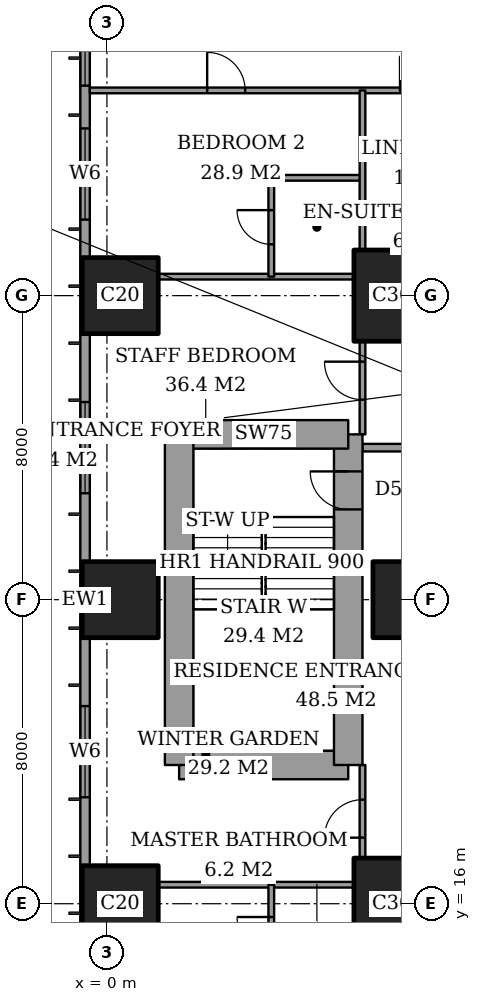
"""IFC4 building model, lengths in metres.
Left out: names, types, materials, properties, quantities, classifications, styles, units other than length and angle.
Written with IfcOpenShell. Run it as: python <this file> out.ifc"""

import sys

from ifc_helpers import new_model, si_unit, direction, frame, frame_2d, origin, origin_2d, place, context, subcontext, project, spatial, rectangle, extrude, element, fill, save


model = new_model("IFC4")
c1 = context("Model", 3, precision=1e-05, world=origin(), true_north=direction((0.0, 1.0)))
c2 = subcontext(c1, "Body", "Model", "MODEL_VIEW")
j1 = project(units=[si_unit("LENGTHUNIT", "METRE"), si_unit("PLANEANGLEUNIT", "RADIAN")], contexts=[c1])
p1 = place(None, origin())
s1 = spatial("IfcSite", under=j1, at=p1, CompositionType="ELEMENT")
p2 = place(p1, origin())
s2 = spatial("IfcBuilding", under=s1, at=p2, CompositionType="ELEMENT")
p3 = place(p2, frame((0.0, 0.0, 44.0)))
s3 = spatial("IfcBuildingStorey", under=s2, at=p3, CompositionType="ELEMENT", Elevation=44.0)
for number, where, z_axis, x_axis in (
    (1, (0.35, 16.0, 0.0), (0.0, 0.0, 1.0), (1.0, 0.0, 0.0)),
    (2, (0.35, 24.0, 0.0), (0.0, 0.0, 1.0), (1.0, 0.0, 0.0)),
    (3, (0.35, 32.0, 0.0), (0.0, 0.0, 1.0), (1.0, 0.0, 0.0)),
):
    element("IfcColumn", number, at=place(p3, frame(where, z_axis=z_axis, x_axis=x_axis)), inside=s3, PredefinedType="COLUMN", context=c2, shape_type="SweptSolid", body=[
        extrude(rectangle(XDim=2.0, YDim=2.0, at=origin_2d()), origin(), (0.0, 0.0, 1.0), 3.6),
    ])
p4 = place(p3, frame((8.0, 16.0, 0.0), z_axis=(0.0, 0.0, 1.0), x_axis=(1.0, 0.0, 0.0)))
e4 = element("IfcColumn", 4, at=p4, inside=s3, PredefinedType="COLUMN", context=c2, shape_type="SweptSolid", body=[
    extrude(rectangle(XDim=3.0, YDim=2.4, at=origin_2d()), origin(), (0.0, 0.0, 1.0), 3.6),
])
p5 = place(p3, frame((8.0, 24.0, 0.0), z_axis=(0.0, 0.0, 1.0), x_axis=(1.0, 0.0, 0.0)))
e5 = element("IfcColumn", 5, at=p5, inside=s3, PredefinedType="COLUMN", context=c2, shape_type="SweptSolid", body=[
    extrude(rectangle(XDim=2.0, YDim=2.0, at=origin_2d()), origin(), (0.0, 0.0, 1.0), 3.6),
])
p6 = place(p3, frame((8.0, 32.0, 0.0), z_axis=(0.0, 0.0, 1.0), x_axis=(1.0, 0.0, 0.0)))
e6 = element("IfcColumn", 6, at=p6, inside=s3, PredefinedType="COLUMN", context=c2, shape_type="SweptSolid", body=[
    extrude(rectangle(XDim=3.0, YDim=2.4, at=origin_2d()), origin(), (0.0, 0.0, 1.0), 3.6),
])
p7 = place(p3, frame((1.9, 19.65, 0.0), z_axis=(0.0, 0.0, 1.0), x_axis=(1.0, 0.0, 0.0)))
e7 = element("IfcWall", 7, at=p7, inside=s3, PredefinedType="SHEAR", context=c2, shape_type="SweptSolid", body=[
    extrude(rectangle(XDim=4.45, YDim=0.75, at=frame_2d((2.225, 0.0))), origin(), (0.0, 0.0, 1.0), 3.6),
])
p8 = place(p3, frame((6.35, 19.65, 0.0), z_axis=(0.0, 0.0, 1.0), x_axis=(0.0, 1.0, 0.0)))
e8 = element("IfcWall", 8, at=p8, inside=s3, PredefinedType="SHEAR", context=c2, shape_type="SweptSolid", body=[
    extrude(rectangle(XDim=8.7, YDim=0.75, at=frame_2d((4.35, 0.0))), origin(), (0.0, 0.0, 1.0), 3.6),
])
p9 = place(p8, frame((6.725, 0.0, 0.0)))
e9 = element("IfcOpeningElement", 9, at=p9, cuts=e8, PredefinedType="OPENING", context=c2, shape_type="SweptSolid", body=[
    extrude(rectangle(XDim=1.0, YDim=2.1, at=frame_2d((0.5, 1.05))), frame((0.0, 0.385, 0.0), z_axis=(0.0, -1.0, 0.0), x_axis=(1.0, 0.0, 0.0)), (0.0, 0.0, 1.0), 0.77),
])
p10 = place(p3, frame((6.35, 28.35, 0.0), z_axis=(0.0, 0.0, 1.0), x_axis=(-1.0, 0.0, 0.0)))
e10 = element("IfcWall", 10, at=p10, inside=s3, PredefinedType="SHEAR", context=c2, shape_type="SweptSolid", body=[
    extrude(rectangle(XDim=4.45, YDim=0.75, at=frame_2d((2.225, 0.0))), origin(), (0.0, 0.0, 1.0), 3.6),
])
p11 = place(p3, frame((1.9, 28.35, 0.0), z_axis=(0.0, 0.0, 1.0), x_axis=(0.0, -1.0, 0.0)))
e11 = element("IfcWall", 11, at=p11, inside=s3, PredefinedType="SHEAR", context=c2, shape_type="SweptSolid", body=[
    extrude(rectangle(XDim=8.7, YDim=0.75, at=frame_2d((4.35, 0.0))), origin(), (0.0, 0.0, 1.0), 3.6),
])
p12 = place(p3, frame((-0.575, 44.825, 0.0), z_axis=(0.0, 0.0, 1.0), x_axis=(0.0, -1.0, 0.0)))
e12 = element("IfcWall", 12, at=p12, inside=s3, PredefinedType="SOLIDWALL", context=c2, shape_type="SweptSolid", body=[
    extrude(rectangle(XDim=41.65, YDim=0.25, at=frame_2d((20.825, 0.0))), origin(), (0.0, 0.0, 1.0), 3.6),
])
p13 = place(p12, frame((0.775, 0.0, 0.6)))
e13 = element("IfcOpeningElement", 13, at=p13, cuts=e12, PredefinedType="OPENING", context=c2, shape_type="SweptSolid", body=[
    extrude(rectangle(XDim=2.4, YDim=2.0, at=frame_2d((1.2, 1.0))), frame((0.0, 0.135, 0.0), z_axis=(0.0, -1.0, 0.0), x_axis=(1.0, 0.0, 0.0)), (0.0, 0.0, 1.0), 0.27),
])
p14 = place(p12, frame((6.1, 0.0, 0.6)))
e14 = element("IfcOpeningElement", 14, at=p14, cuts=e12, PredefinedType="OPENING", context=c2, shape_type="SweptSolid", body=[
    extrude(rectangle(XDim=1.2, YDim=2.0, at=frame_2d((0.6, 1.0))), frame((0.0, 0.135, 0.0), z_axis=(0.0, -1.0, 0.0), x_axis=(1.0, 0.0, 0.0)), (0.0, 0.0, 1.0), 0.27),
])
p15 = place(p12, frame((8.425, 0.0, 0.6)))
e15 = element("IfcOpeningElement", 15, at=p15, cuts=e12, PredefinedType="OPENING", context=c2, shape_type="SweptSolid", body=[
    extrude(rectangle(XDim=2.4, YDim=2.0, at=frame_2d((1.2, 1.0))), frame((0.0, 0.135, 0.0), z_axis=(0.0, -1.0, 0.0), x_axis=(1.0, 0.0, 0.0)), (0.0, 0.0, 1.0), 0.27),
])
p16 = place(p12, frame((15.625, 0.0, 0.6)))
e16 = element("IfcOpeningElement", 16, at=p16, cuts=e12, PredefinedType="OPENING", context=c2, shape_type="SweptSolid", body=[
    extrude(rectangle(XDim=2.4, YDim=2.0, at=frame_2d((1.2, 1.0))), frame((0.0, 0.135, 0.0), z_axis=(0.0, -1.0, 0.0), x_axis=(1.0, 0.0, 0.0)), (0.0, 0.0, 1.0), 0.27),
])
p17 = place(p12, frame((23.625, 0.0, 0.6)))
e17 = element("IfcOpeningElement", 17, at=p17, cuts=e12, PredefinedType="OPENING", context=c2, shape_type="SweptSolid", body=[
    extrude(rectangle(XDim=2.4, YDim=2.0, at=frame_2d((1.2, 1.0))), frame((0.0, 0.135, 0.0), z_axis=(0.0, -1.0, 0.0), x_axis=(1.0, 0.0, 0.0)), (0.0, 0.0, 1.0), 0.27),
])
p18 = place(p12, frame((30.825, 0.0, 0.6)))
e18 = element("IfcOpeningElement", 18, at=p18, cuts=e12, PredefinedType="OPENING", context=c2, shape_type="SweptSolid", body=[
    extrude(rectangle(XDim=2.4, YDim=2.0, at=frame_2d((1.2, 1.0))), frame((0.0, 0.135, 0.0), z_axis=(0.0, -1.0, 0.0), x_axis=(1.0, 0.0, 0.0)), (0.0, 0.0, 1.0), 0.27),
])
p19 = place(p12, frame((34.5, 0.0, 0.6)))
e19 = element("IfcOpeningElement", 19, at=p19, cuts=e12, PredefinedType="OPENING", context=c2, shape_type="SweptSolid", body=[
    extrude(rectangle(XDim=1.2, YDim=2.0, at=frame_2d((0.6, 1.0))), frame((0.0, 0.135, 0.0), z_axis=(0.0, -1.0, 0.0), x_axis=(1.0, 0.0, 0.0)), (0.0, 0.0, 1.0), 0.27),
])
p20 = place(p12, frame((38.475, 0.0, 0.6)))
e20 = element("IfcOpeningElement", 20, at=p20, cuts=e12, PredefinedType="OPENING", context=c2, shape_type="SweptSolid", body=[
    extrude(rectangle(XDim=2.4, YDim=2.0, at=frame_2d((1.2, 1.0))), frame((0.0, 0.135, 0.0), z_axis=(0.0, -1.0, 0.0), x_axis=(1.0, 0.0, 0.0)), (0.0, 0.0, 1.0), 0.27),
])
p21 = place(p3, frame((1.35, 16.5, 0.0), z_axis=(0.0, 0.0, 1.0), x_axis=(1.0, 0.0, 0.0)))
e21 = element("IfcWall", 21, at=p21, inside=s3, PredefinedType="PARTITIONING", context=c2, shape_type="SweptSolid", body=[
    extrude(rectangle(XDim=5.15, YDim=0.15, at=frame_2d((2.575, 0.0))), origin(), (0.0, 0.0, 1.0), 3.35),
])
p22 = place(p3, frame((6.725, 28.0, 0.0), z_axis=(0.0, 0.0, 1.0), x_axis=(1.0, 0.0, 0.0)))
e22 = element("IfcWall", 22, at=p22, inside=s3, PredefinedType="PARTITIONING", context=c2, shape_type="SweptSolid", body=[
    extrude(rectangle(XDim=17.275, YDim=0.2, at=frame_2d((8.637, 0.0))), origin(), (0.0, 0.0, 1.0), 3.35),
])
p23 = place(p22, frame((6.475, 0.0, 0.0)))
e23 = element("IfcOpeningElement", 23, at=p23, cuts=e22, PredefinedType="OPENING", context=c2, shape_type="SweptSolid", body=[
    extrude(rectangle(XDim=1.2, YDim=2.4, at=frame_2d((0.6, 1.2))), frame((0.0, 0.11, 0.0), z_axis=(0.0, -1.0, 0.0), x_axis=(1.0, 0.0, 0.0)), (0.0, 0.0, 1.0), 0.22),
])
p24 = place(p3, frame((1.35, 32.5, 0.0), z_axis=(0.0, 0.0, 1.0), x_axis=(1.0, 0.0, 0.0)))
e24 = element("IfcWall", 24, at=p24, inside=s3, PredefinedType="PARTITIONING", context=c2, shape_type="SweptSolid", body=[
    extrude(rectangle(XDim=5.15, YDim=0.15, at=frame_2d((2.575, 0.0))), origin(), (0.0, 0.0, 1.0), 3.35),
])
p25 = place(p3, frame((4.325, 35.1, 0.0), z_axis=(0.0, 0.0, 1.0), x_axis=(1.0, 0.0, 0.0)))
e25 = element("IfcWall", 25, at=p25, inside=s3, PredefinedType="PARTITIONING", context=c2, shape_type="SweptSolid", body=[
    extrude(rectangle(XDim=2.4, YDim=0.15, at=frame_2d((1.2, 0.0))), origin(), (0.0, 0.0, 1.0), 3.35),
])
p26 = place(p3, frame((-0.45, 37.4, 0.0), z_axis=(0.0, 0.0, 1.0), x_axis=(1.0, 0.0, 0.0)))
e26 = element("IfcWall", 26, at=p26, inside=s3, PredefinedType="PARTITIONING", context=c2, shape_type="SweptSolid", body=[
    extrude(rectangle(XDim=25.011, YDim=0.15, at=frame_2d((12.505, 0.0))), origin(), (0.0, 0.0, 1.0), 3.35),
])
p27 = place(p26, frame((10.65, 0.0, 0.0)))
e27 = element("IfcOpeningElement", 27, at=p27, cuts=e26, PredefinedType="OPENING", context=c2, shape_type="SweptSolid", body=[
    extrude(rectangle(XDim=1.0, YDim=2.1, at=frame_2d((0.5, 1.05))), frame((0.0, 0.085, 0.0), z_axis=(0.0, -1.0, 0.0), x_axis=(1.0, 0.0, 0.0)), (0.0, 0.0, 1.0), 0.17),
])
p28 = place(p26, frame((3.087, 0.0, 0.0)))
e28 = element("IfcOpeningElement", 28, at=p28, cuts=e26, PredefinedType="OPENING", context=c2, shape_type="SweptSolid", body=[
    extrude(rectangle(XDim=1.0, YDim=2.1, at=frame_2d((0.5, 1.05))), frame((0.0, 0.085, 0.0), z_axis=(0.0, -1.0, 0.0), x_axis=(1.0, 0.0, 0.0)), (0.0, 0.0, 1.0), 0.17),
])
p29 = place(p26, frame((8.163, 0.0, 0.0)))
e29 = element("IfcOpeningElement", 29, at=p29, cuts=e26, PredefinedType="OPENING", context=c2, shape_type="SweptSolid", body=[
    extrude(rectangle(XDim=0.9, YDim=2.1, at=frame_2d((0.45, 1.05))), frame((0.0, 0.085, 0.0), z_axis=(0.0, -1.0, 0.0), x_axis=(1.0, 0.0, 0.0)), (0.0, 0.0, 1.0), 0.17),
])
p30 = place(p26, frame((13.35, 0.0, 0.0)))
e30 = element("IfcOpeningElement", 30, at=p30, cuts=e26, PredefinedType="OPENING", context=c2, shape_type="SweptSolid", body=[
    extrude(rectangle(XDim=1.0, YDim=2.1, at=frame_2d((0.5, 1.05))), frame((0.0, 0.085, 0.0), z_axis=(0.0, -1.0, 0.0), x_axis=(1.0, 0.0, 0.0)), (0.0, 0.0, 1.0), 0.17),
])
p31 = place(p26, frame((16.45, 0.0, 0.0)))
e31 = element("IfcOpeningElement", 31, at=p31, cuts=e26, PredefinedType="OPENING", context=c2, shape_type="SweptSolid", body=[
    extrude(rectangle(XDim=1.0, YDim=2.1, at=frame_2d((0.5, 1.05))), frame((0.0, 0.085, 0.0), z_axis=(0.0, -1.0, 0.0), x_axis=(1.0, 0.0, 0.0)), (0.0, 0.0, 1.0), 0.17),
])
p32 = place(p26, frame((21.175, 0.0, 0.0)))
e32 = element("IfcOpeningElement", 32, at=p32, cuts=e26, PredefinedType="OPENING", context=c2, shape_type="SweptSolid", body=[
    extrude(rectangle(XDim=1.0, YDim=2.1, at=frame_2d((0.5, 1.05))), frame((0.0, 0.085, 0.0), z_axis=(0.0, -1.0, 0.0), x_axis=(1.0, 0.0, 0.0)), (0.0, 0.0, 1.0), 0.17),
])
p33 = place(p3, frame((4.325, 13.9, 0.0), z_axis=(0.0, 0.0, 1.0), x_axis=(0.0, 1.0, 0.0)))
e33 = element("IfcWall", 33, at=p33, inside=s3, PredefinedType="PARTITIONING", context=c2, shape_type="SweptSolid", body=[
    extrude(rectangle(XDim=2.6, YDim=0.15, at=frame_2d((1.3, 0.0))), origin(), (0.0, 0.0, 1.0), 3.35),
])
p34 = place(p33, frame((0.85, 0.0, 0.0)))
e34 = element("IfcOpeningElement", 34, at=p34, cuts=e33, PredefinedType="OPENING", context=c2, shape_type="SweptSolid", body=[
    extrude(rectangle(XDim=0.9, YDim=2.1, at=frame_2d((0.45, 1.05))), frame((0.0, 0.085, 0.0), z_axis=(0.0, -1.0, 0.0), x_axis=(1.0, 0.0, 0.0)), (0.0, 0.0, 1.0), 0.17),
])
p35 = place(p3, frame((4.325, 32.5, 0.0), z_axis=(0.0, 0.0, 1.0), x_axis=(0.0, 1.0, 0.0)))
e35 = element("IfcWall", 35, at=p35, inside=s3, PredefinedType="PARTITIONING", context=c2, shape_type="SweptSolid", body=[
    extrude(rectangle(XDim=2.6, YDim=0.15, at=frame_2d((1.3, 0.0))), origin(), (0.0, 0.0, 1.0), 3.35),
])
p36 = place(p35, frame((0.85, 0.0, 0.0)))
e36 = element("IfcOpeningElement", 36, at=p36, cuts=e35, PredefinedType="OPENING", context=c2, shape_type="SweptSolid", body=[
    extrude(rectangle(XDim=0.9, YDim=2.1, at=frame_2d((0.45, 1.05))), frame((0.0, 0.085, 0.0), z_axis=(0.0, -1.0, 0.0), x_axis=(1.0, 0.0, 0.0)), (0.0, 0.0, 1.0), 0.17),
])
p37 = place(p3, frame((6.725, 17.2, 0.0), z_axis=(0.0, 0.0, 1.0), x_axis=(0.0, 1.0, 0.0)))
e37 = element("IfcWall", 37, at=p37, inside=s3, PredefinedType="PARTITIONING", context=c2, shape_type="SweptSolid", body=[
    extrude(rectangle(XDim=2.45, YDim=0.15, at=frame_2d((1.225, 0.0))), origin(), (0.0, 0.0, 1.0), 3.35),
])
p38 = place(p37, frame((0.538, 0.0, 0.0)))
e38 = element("IfcOpeningElement", 38, at=p38, cuts=e37, PredefinedType="OPENING", context=c2, shape_type="SweptSolid", body=[
    extrude(rectangle(XDim=1.0, YDim=2.1, at=frame_2d((0.5, 1.05))), frame((0.0, 0.085, 0.0), z_axis=(0.0, -1.0, 0.0), x_axis=(1.0, 0.0, 0.0)), (0.0, 0.0, 1.0), 0.17),
])
p39 = place(p3, frame((6.725, 28.35, 0.0), z_axis=(0.0, 0.0, 1.0), x_axis=(0.0, 1.0, 0.0)))
e39 = element("IfcWall", 39, at=p39, inside=s3, PredefinedType="PARTITIONING", context=c2, shape_type="SweptSolid", body=[
    extrude(rectangle(XDim=2.45, YDim=0.15, at=frame_2d((1.225, 0.0))), origin(), (0.0, 0.0, 1.0), 3.35),
])
p40 = place(p39, frame((0.913, 0.0, 0.0)))
e40 = element("IfcOpeningElement", 40, at=p40, cuts=e39, PredefinedType="OPENING", context=c2, shape_type="SweptSolid", body=[
    extrude(rectangle(XDim=1.0, YDim=2.1, at=frame_2d((0.5, 1.05))), frame((0.0, 0.085, 0.0), z_axis=(0.0, -1.0, 0.0), x_axis=(1.0, 0.0, 0.0)), (0.0, 0.0, 1.0), 0.17),
])
p41 = place(p3, frame((6.725, 33.2, 0.0), z_axis=(0.0, 0.0, 1.0), x_axis=(0.0, 1.0, 0.0)))
e41 = element("IfcWall", 41, at=p41, inside=s3, PredefinedType="PARTITIONING", context=c2, shape_type="SweptSolid", body=[
    extrude(rectangle(XDim=4.2, YDim=0.15, at=frame_2d((2.1, 0.0))), origin(), (0.0, 0.0, 1.0), 3.35),
])
p42 = place(p14, origin())
e42 = element("IfcWindow", 42, at=p42, inside=s3, PartitioningType="SINGLE_PANEL", PredefinedType="WINDOW", context=c2, shape_type="SweptSolid", body=[
    extrude(rectangle(XDim=1.2, YDim=2.0, at=frame_2d((0.6, 1.0))), frame((0.0, 0.03, 0.0), z_axis=(0.0, -1.0, 0.0), x_axis=(1.0, 0.0, 0.0)), (0.0, 0.0, 1.0), 0.06),
])
fill(e14, e42)
p43 = place(p15, origin())
e43 = element("IfcWindow", 43, at=p43, inside=s3, PartitioningType="SINGLE_PANEL", PredefinedType="WINDOW", context=c2, shape_type="SweptSolid", body=[
    extrude(rectangle(XDim=2.4, YDim=2.0, at=frame_2d((1.2, 1.0))), frame((0.0, 0.03, 0.0), z_axis=(0.0, -1.0, 0.0), x_axis=(1.0, 0.0, 0.0)), (0.0, 0.0, 1.0), 0.06),
])
fill(e15, e43)
p44 = place(p16, origin())
e44 = element("IfcWindow", 44, at=p44, inside=s3, PartitioningType="SINGLE_PANEL", PredefinedType="WINDOW", context=c2, shape_type="SweptSolid", body=[
    extrude(rectangle(XDim=2.4, YDim=2.0, at=frame_2d((1.2, 1.0))), frame((0.0, 0.03, 0.0), z_axis=(0.0, -1.0, 0.0), x_axis=(1.0, 0.0, 0.0)), (0.0, 0.0, 1.0), 0.06),
])
fill(e16, e44)
p45 = place(p17, origin())
e45 = element("IfcWindow", 45, at=p45, inside=s3, PartitioningType="SINGLE_PANEL", PredefinedType="WINDOW", context=c2, shape_type="SweptSolid", body=[
    extrude(rectangle(XDim=2.4, YDim=2.0, at=frame_2d((1.2, 1.0))), frame((0.0, 0.03, 0.0), z_axis=(0.0, -1.0, 0.0), x_axis=(1.0, 0.0, 0.0)), (0.0, 0.0, 1.0), 0.06),
])
fill(e17, e45)
p46 = place(p34, origin())
e46 = element("IfcDoor", 46, at=p46, inside=s3, OperationType="SINGLE_SWING_LEFT", PredefinedType="DOOR", context=c2, shape_type="SweptSolid", body=[
    extrude(rectangle(XDim=0.9, YDim=2.1, at=frame_2d((0.45, 1.05))), frame((0.0, 0.025, 0.0), z_axis=(0.0, -1.0, 0.0), x_axis=(1.0, 0.0, 0.0)), (0.0, 0.0, 1.0), 0.05),
])
fill(e34, e46)
p47 = place(p38, origin())
e47 = element("IfcDoor", 47, at=p47, inside=s3, OperationType="SINGLE_SWING_RIGHT", PredefinedType="DOOR", context=c2, shape_type="SweptSolid", body=[
    extrude(rectangle(XDim=1.0, YDim=2.1, at=frame_2d((0.5, 1.05))), frame((0.0, 0.025, 0.0), z_axis=(0.0, -1.0, 0.0), x_axis=(1.0, 0.0, 0.0)), (0.0, 0.0, 1.0), 0.05),
])
fill(e38, e47)
p48 = place(p36, origin())
e48 = element("IfcDoor", 48, at=p48, inside=s3, OperationType="SINGLE_SWING_LEFT", PredefinedType="DOOR", context=c2, shape_type="SweptSolid", body=[
    extrude(rectangle(XDim=0.9, YDim=2.1, at=frame_2d((0.45, 1.05))), frame((0.0, 0.025, 0.0), z_axis=(0.0, -1.0, 0.0), x_axis=(1.0, 0.0, 0.0)), (0.0, 0.0, 1.0), 0.05),
])
fill(e36, e48)
p49 = place(p28, origin())
e49 = element("IfcDoor", 49, at=p49, inside=s3, OperationType="SINGLE_SWING_RIGHT", PredefinedType="DOOR", context=c2, shape_type="SweptSolid", body=[
    extrude(rectangle(XDim=1.0, YDim=2.1, at=frame_2d((0.5, 1.05))), frame((0.0, 0.025, 0.0), z_axis=(0.0, -1.0, 0.0), x_axis=(1.0, 0.0, 0.0)), (0.0, 0.0, 1.0), 0.05),
])
fill(e28, e49)
p50 = place(p40, origin())
e50 = element("IfcDoor", 50, at=p50, inside=s3, OperationType="SINGLE_SWING_LEFT", PredefinedType="DOOR", context=c2, shape_type="SweptSolid", body=[
    extrude(rectangle(XDim=1.0, YDim=2.1, at=frame_2d((0.5, 1.05))), frame((0.0, 0.025, 0.0), z_axis=(0.0, -1.0, 0.0), x_axis=(1.0, 0.0, 0.0)), (0.0, 0.0, 1.0), 0.05),
])
fill(e40, e50)
p51 = place(p29, origin())
e51 = element("IfcDoor", 51, at=p51, inside=s3, OperationType="SINGLE_SWING_RIGHT", PredefinedType="DOOR", context=c2, shape_type="SweptSolid", body=[
    extrude(rectangle(XDim=0.9, YDim=2.1, at=frame_2d((0.45, 1.05))), frame((0.0, 0.025, 0.0), z_axis=(0.0, -1.0, 0.0), x_axis=(1.0, 0.0, 0.0)), (0.0, 0.0, 1.0), 0.05),
])
fill(e29, e51)
p52 = place(p9, origin())
e52 = element("IfcDoor", 52, at=p52, inside=s3, OperationType="SINGLE_SWING_LEFT", PredefinedType="DOOR", context=c2, shape_type="SweptSolid", body=[
    extrude(rectangle(XDim=1.0, YDim=2.1, at=frame_2d((0.5, 1.05))), frame((0.0, 0.025, 0.0), z_axis=(0.0, -1.0, 0.0), x_axis=(1.0, 0.0, 0.0)), (0.0, 0.0, 1.0), 0.05),
])
fill(e9, e52)
save(model, sys.argv[1])
